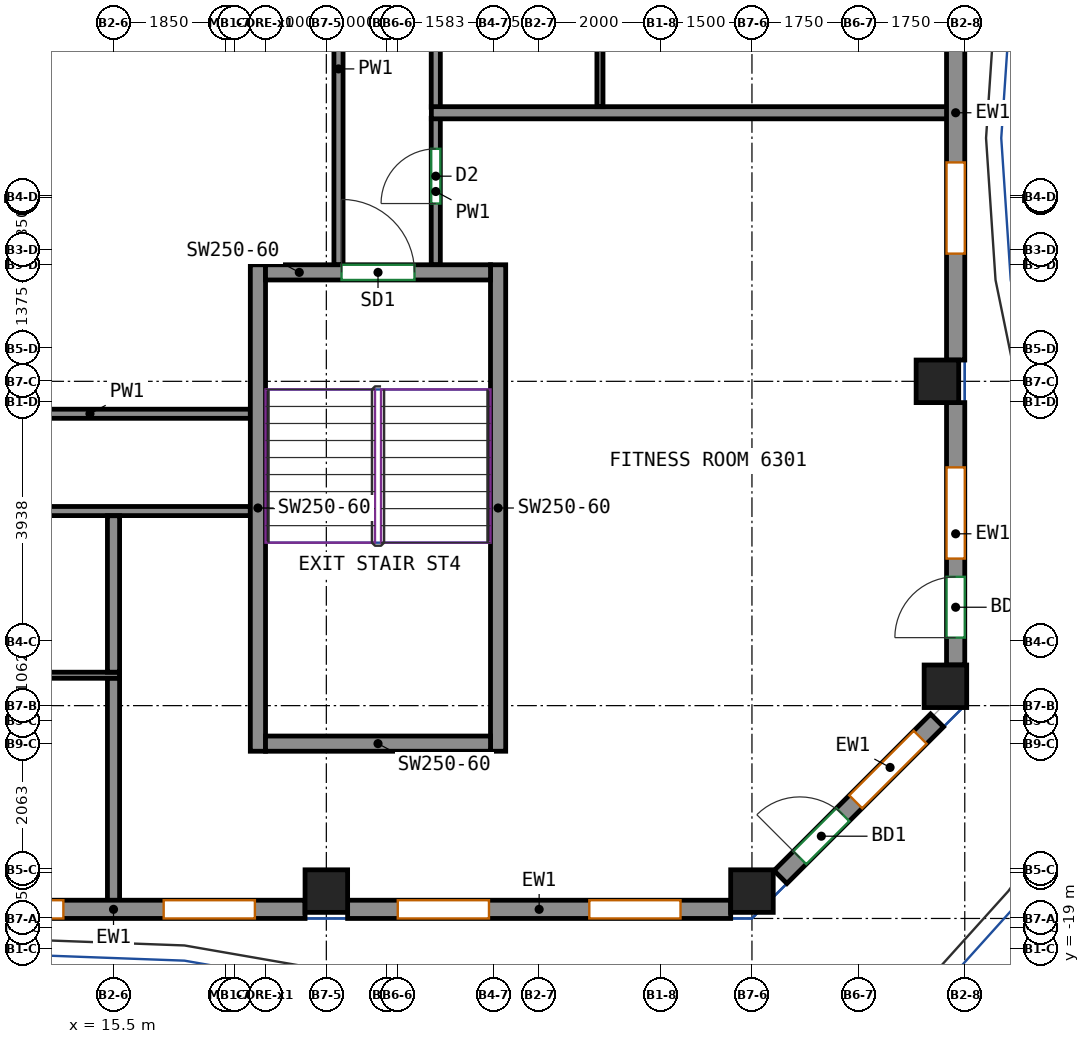
"""IFC4 building model, lengths in metres.
Left out: names, types, materials, properties, quantities, classifications, styles, units other than length and angle.
Written with IfcOpenShell. Run it as: python <this file> out.ifc"""

import sys

from ifc_helpers import new_model, si_unit, direction, frame, frame_2d, origin, origin_2d, place, context, subcontext, project, spatial, rectangle, extrude, source, transform, mapped, element, fill, save


model = new_model("IFC4")
c1 = context("Model", 3, precision=1e-05, world=origin(), true_north=direction((0.0, 1.0)))
c2 = subcontext(c1, "Body", "Model", "MODEL_VIEW")
j1 = project(units=[si_unit("LENGTHUNIT", "METRE"), si_unit("PLANEANGLEUNIT", "RADIAN")], contexts=[c1])
p1 = place(None, origin())
s1 = spatial("IfcSite", under=j1, at=p1, CompositionType="ELEMENT")
p2 = place(p1, origin())
s2 = spatial("IfcBuilding", under=s1, at=p2, CompositionType="ELEMENT")
p3 = place(p2, frame((0.0, 0.0, 259.4)))
s3 = spatial("IfcBuildingStorey", under=s2, at=p3, CompositionType="ELEMENT", Elevation=259.4)
m1 = source(origin(), c2, "Body", "SweptSolid", [
    extrude(rectangle(XDim=0.7, YDim=0.7, at=origin_2d()), origin(), (0.0, 0.0, 1.0), 3.0),
])
for number, where, z_axis, x_axis in (
    (1, (19.0, -18.05, 0.0), (0.0, 0.0, 1.0), (1.0, 0.0, 0.0)),
    (2, (26.0, -18.05, 0.0), (0.0, 0.0, 1.0), (1.0, 0.0, 0.0)),
    (3, (29.05, -9.667, 0.0), (0.0, 0.0, 1.0), (1.0, 0.0, 0.0)),
    (4, (29.182, -14.682, 0.0), (0.0, 0.0, 1.0), (1.0, 0.0, 0.0)),
):
    element("IfcColumn", number, at=place(p3, frame(where, z_axis=z_axis, x_axis=x_axis)), inside=s3, PredefinedType="COLUMN", context=c2, shape_type="MappedRepresentation", body=[
        mapped(m1, transform((0.0, 0.0, 0.0))),
    ])
m2 = source(origin(), c2, "Body", "SweptSolid", [
    extrude(rectangle(XDim=8.0, YDim=0.25, at=frame_2d((4.0, 0.0))), origin(), (0.0, 0.0, 1.0), 3.0),
])
for number, where, z_axis, x_axis in (
    (5, (17.875, -15.75, 0.0), (0.0, 0.0, 1.0), (0.0, 1.0, 0.0)),
    (6, (21.825, -15.75, 0.0), (0.0, 0.0, 1.0), (0.0, 1.0, 0.0)),
):
    element("IfcWall", number, at=place(p3, frame(where, z_axis=z_axis, x_axis=x_axis)), inside=s3, PredefinedType="SHEAR", context=c2, shape_type="MappedRepresentation", body=[
        mapped(m2, transform((0.0, 0.0, 0.0))),
    ])
m3 = source(origin(), c2, "Body", "SweptSolid", [
    extrude(rectangle(XDim=3.7, YDim=0.25, at=frame_2d((1.85, 0.0))), origin(), (0.0, 0.0, 1.0), 3.0),
])
p4 = place(p3, frame((18.0, -15.625, 0.0), z_axis=(0.0, 0.0, 1.0), x_axis=(1.0, 0.0, 0.0)))
e7 = element("IfcWall", 7, at=p4, inside=s3, PredefinedType="SHEAR", context=c2, shape_type="MappedRepresentation", body=[
    mapped(m3, transform((0.0, 0.0, 0.0))),
])
p5 = place(p3, frame((18.0, -7.875, 0.0), z_axis=(0.0, 0.0, 1.0), x_axis=(1.0, 0.0, 0.0)))
e8 = element("IfcWall", 8, at=p5, inside=s3, PredefinedType="SHEAR", context=c2, shape_type="MappedRepresentation", body=[
    mapped(m3, transform((0.0, 0.0, 0.0))),
])
p6 = place(p5, frame((1.25, 0.0, 0.0)))
e9 = element("IfcOpeningElement", 9, at=p6, cuts=e8, PredefinedType="OPENING", context=c2, shape_type="SweptSolid", body=[
    extrude(rectangle(XDim=1.2, YDim=2.1, at=frame_2d((0.6, 1.05))), frame((0.0, 0.135, 0.0), z_axis=(0.0, -1.0, 0.0), x_axis=(1.0, 0.0, 0.0)), (0.0, 0.0, 1.0), 0.27),
])
m4 = source(origin(), c2, "Body", "SweptSolid", [
    extrude(rectangle(XDim=6.3, YDim=0.3, at=frame_2d((3.15, 0.0))), origin(), (0.0, 0.0, 1.0), 3.0),
])
p7 = place(p3, frame((12.35, -18.35, 0.0), z_axis=(0.0, 0.0, 1.0), x_axis=(1.0, 0.0, 0.0)))
e10 = element("IfcWall", 10, at=p7, inside=s3, PredefinedType="SOLIDWALL", context=c2, shape_type="MappedRepresentation", body=[
    mapped(m4, transform((0.0, 0.0, 0.0))),
])
p8 = place(p7, frame((0.825, 0.0, 0.8)))
e11 = element("IfcOpeningElement", 11, at=p8, cuts=e10, PredefinedType="OPENING", context=c2, shape_type="SweptSolid", body=[
    extrude(rectangle(XDim=1.5, YDim=2.05, at=frame_2d((0.75, 1.025))), frame((0.0, 0.16, 0.0), z_axis=(0.0, -1.0, 0.0), x_axis=(1.0, 0.0, 0.0)), (0.0, 0.0, 1.0), 0.32),
])
p9 = place(p7, frame((3.975, 0.0, 0.8)))
e12 = element("IfcOpeningElement", 12, at=p9, cuts=e10, PredefinedType="OPENING", context=c2, shape_type="SweptSolid", body=[
    extrude(rectangle(XDim=1.5, YDim=2.05, at=frame_2d((0.75, 1.025))), frame((0.0, 0.16, 0.0), z_axis=(0.0, -1.0, 0.0), x_axis=(1.0, 0.0, 0.0)), (0.0, 0.0, 1.0), 0.32),
])
p10 = place(p3, frame((19.35, -18.35, 0.0), z_axis=(0.0, 0.0, 1.0), x_axis=(1.0, 0.0, 0.0)))
e13 = element("IfcWall", 13, at=p10, inside=s3, PredefinedType="SOLIDWALL", context=c2, shape_type="MappedRepresentation", body=[
    mapped(m4, transform((0.0, 0.0, 0.0))),
])
p11 = place(p10, frame((0.825, 0.0, 0.8)))
e14 = element("IfcOpeningElement", 14, at=p11, cuts=e13, PredefinedType="OPENING", context=c2, shape_type="SweptSolid", body=[
    extrude(rectangle(XDim=1.5, YDim=2.05, at=frame_2d((0.75, 1.025))), frame((0.0, 0.16, 0.0), z_axis=(0.0, -1.0, 0.0), x_axis=(1.0, 0.0, 0.0)), (0.0, 0.0, 1.0), 0.32),
])
p12 = place(p10, frame((3.975, 0.0, 0.8)))
e15 = element("IfcOpeningElement", 15, at=p12, cuts=e13, PredefinedType="OPENING", context=c2, shape_type="SweptSolid", body=[
    extrude(rectangle(XDim=1.5, YDim=2.05, at=frame_2d((0.75, 1.025))), frame((0.0, 0.16, 0.0), z_axis=(0.0, -1.0, 0.0), x_axis=(1.0, 0.0, 0.0)), (0.0, 0.0, 1.0), 0.32),
])
m5 = source(origin(), c2, "Body", "SweptSolid", [
    extrude(rectangle(XDim=3.642, YDim=0.3, at=frame_2d((1.821, 0.0))), origin(), (0.0, 0.0, 1.0), 3.0),
])
p13 = place(p3, frame((26.469, -17.819, 0.0), z_axis=(0.0, 0.0, 1.0), x_axis=(0.707106781187, 0.707106781187, 0.0)))
e16 = element("IfcWall", 16, at=p13, inside=s3, PredefinedType="SOLIDWALL", context=c2, shape_type="MappedRepresentation", body=[
    mapped(m5, transform((0.0, 0.0, 0.0))),
])
p14 = place(p13, frame((1.75, 0.0, 0.8)))
e17 = element("IfcOpeningElement", 17, at=p14, cuts=e16, PredefinedType="OPENING", context=c2, shape_type="SweptSolid", body=[
    extrude(rectangle(XDim=1.5, YDim=2.05, at=frame_2d((0.75, 1.025))), frame((0.0, 0.16, 0.0), z_axis=(0.0, -1.0, 0.0), x_axis=(1.0, 0.0, 0.0)), (0.0, 0.0, 1.0), 0.32),
])
p15 = place(p13, frame((0.45, 0.0, 0.0)))
e18 = element("IfcOpeningElement", 18, at=p15, cuts=e16, PredefinedType="OPENING", context=c2, shape_type="SweptSolid", body=[
    extrude(rectangle(XDim=1.0, YDim=2.1, at=frame_2d((0.5, 1.05))), frame((0.0, 0.16, 0.0), z_axis=(0.0, -1.0, 0.0), x_axis=(1.0, 0.0, 0.0)), (0.0, 0.0, 1.0), 0.32),
])
m6 = source(origin(), c2, "Body", "SweptSolid", [
    extrude(rectangle(XDim=4.315, YDim=0.3, at=frame_2d((2.158, 0.0))), origin(), (0.0, 0.0, 1.0), 3.0),
])
p16 = place(p3, frame((29.35, -14.332, 0.0), z_axis=(0.0, 0.0, 1.0), x_axis=(0.0, 1.0, 0.0)))
e19 = element("IfcWall", 19, at=p16, inside=s3, PredefinedType="SOLIDWALL", context=c2, shape_type="MappedRepresentation", body=[
    mapped(m6, transform((0.0, 0.0, 0.0))),
])
p17 = place(p16, frame((1.75, 0.0, 0.8)))
e20 = element("IfcOpeningElement", 20, at=p17, cuts=e19, PredefinedType="OPENING", context=c2, shape_type="SweptSolid", body=[
    extrude(rectangle(XDim=1.5, YDim=2.05, at=frame_2d((0.75, 1.025))), frame((0.0, 0.16, 0.0), z_axis=(0.0, -1.0, 0.0), x_axis=(1.0, 0.0, 0.0)), (0.0, 0.0, 1.0), 0.32),
])
p18 = place(p16, frame((0.45, 0.0, 0.0)))
e21 = element("IfcOpeningElement", 21, at=p18, cuts=e19, PredefinedType="OPENING", context=c2, shape_type="SweptSolid", body=[
    extrude(rectangle(XDim=1.0, YDim=2.1, at=frame_2d((0.5, 1.05))), frame((0.0, 0.16, 0.0), z_axis=(0.0, -1.0, 0.0), x_axis=(1.0, 0.0, 0.0)), (0.0, 0.0, 1.0), 0.32),
])
m7 = source(origin(), c2, "Body", "SweptSolid", [
    extrude(rectangle(XDim=8.133, YDim=0.3, at=frame_2d((4.067, 0.0))), origin(), (0.0, 0.0, 1.0), 3.0),
])
p19 = place(p3, frame((29.35, -9.317, 0.0), z_axis=(0.0, 0.0, 1.0), x_axis=(0.0, 1.0, 0.0)))
e22 = element("IfcWall", 22, at=p19, inside=s3, PredefinedType="SOLIDWALL", context=c2, shape_type="MappedRepresentation", body=[
    mapped(m7, transform((0.0, 0.0, 0.0))),
])
p20 = place(p19, frame((1.75, 0.0, 0.8)))
e23 = element("IfcOpeningElement", 23, at=p20, cuts=e22, PredefinedType="OPENING", context=c2, shape_type="SweptSolid", body=[
    extrude(rectangle(XDim=1.5, YDim=2.05, at=frame_2d((0.75, 1.025))), frame((0.0, 0.16, 0.0), z_axis=(0.0, -1.0, 0.0), x_axis=(1.0, 0.0, 0.0)), (0.0, 0.0, 1.0), 0.32),
])
p21 = place(p19, frame((5.817, 0.0, 0.8)))
e24 = element("IfcOpeningElement", 24, at=p21, cuts=e22, PredefinedType="OPENING", context=c2, shape_type="SweptSolid", body=[
    extrude(rectangle(XDim=1.5, YDim=2.05, at=frame_2d((0.75, 1.025))), frame((0.0, 0.16, 0.0), z_axis=(0.0, -1.0, 0.0), x_axis=(1.0, 0.0, 0.0)), (0.0, 0.0, 1.0), 0.32),
])
p22 = place(p3, frame((-11.8, -11.8, 0.0), z_axis=(0.0, 0.0, 1.0), x_axis=(1.0, 0.0, 0.0)))
e25 = element("IfcWall", 25, at=p22, inside=s3, PredefinedType="PARTITIONING", context=c2, shape_type="SweptSolid", body=[
    extrude(rectangle(XDim=29.55, YDim=0.15, at=frame_2d((14.775, 0.0))), origin(), (0.0, 0.0, 1.0), 3.0),
])
p23 = place(p22, frame((8.26, 0.0, 0.0)))
e26 = element("IfcOpeningElement", 26, at=p23, cuts=e25, PredefinedType="OPENING", context=c2, shape_type="SweptSolid", body=[
    extrude(rectangle(XDim=1.0, YDim=2.1, at=frame_2d((0.5, 1.05))), frame((0.0, 0.085, 0.0), z_axis=(0.0, -1.0, 0.0), x_axis=(1.0, 0.0, 0.0)), (0.0, 0.0, 1.0), 0.17),
])
p24 = place(p3, frame((20.8, -7.75, 0.0), z_axis=(0.0, 0.0, 1.0), x_axis=(0.0, 1.0, 0.0)))
e27 = element("IfcWall", 27, at=p24, inside=s3, PredefinedType="PARTITIONING", context=c2, shape_type="SweptSolid", body=[
    extrude(rectangle(XDim=2.41, YDim=0.15, at=frame_2d((1.205, 0.0))), origin(), (0.0, 0.0, 1.0), 3.0),
])
p25 = place(p24, frame((1.007, 0.0, 0.0)))
e28 = element("IfcOpeningElement", 28, at=p25, cuts=e27, PredefinedType="OPENING", context=c2, shape_type="SweptSolid", body=[
    extrude(rectangle(XDim=0.9, YDim=2.1, at=frame_2d((0.45, 1.05))), frame((0.0, 0.085, 0.0), z_axis=(0.0, -1.0, 0.0), x_axis=(1.0, 0.0, 0.0)), (0.0, 0.0, 1.0), 0.17),
])
p26 = place(p3, frame((20.8, -5.16, 0.0), z_axis=(0.0, 0.0, 1.0), x_axis=(0.0, 1.0, 0.0)))
e29 = element("IfcWall", 29, at=p26, inside=s3, PredefinedType="PARTITIONING", context=c2, shape_type="SweptSolid", body=[
    extrude(rectangle(XDim=5.32, YDim=0.15, at=frame_2d((2.66, 0.0))), origin(), (0.0, 0.0, 1.0), 3.0),
])
p27 = place(p3, frame((19.2, -7.75, 0.0), z_axis=(0.0, 0.0, 1.0), x_axis=(0.0, 1.0, 0.0)))
e30 = element("IfcWall", 30, at=p27, inside=s3, PredefinedType="PARTITIONING", context=c2, shape_type="SweptSolid", body=[
    extrude(rectangle(XDim=6.442, YDim=0.15, at=frame_2d((3.221, 0.0))), origin(), (0.0, 0.0, 1.0), 3.0),
])
p28 = place(p3, frame((12.475, -10.2, 0.0), z_axis=(0.0, 0.0, 1.0), x_axis=(1.0, 0.0, 0.0)))
e31 = element("IfcWall", 31, at=p28, inside=s3, PredefinedType="PARTITIONING", context=c2, shape_type="SweptSolid", body=[
    extrude(rectangle(XDim=5.275, YDim=0.15, at=frame_2d((2.637, 0.0))), origin(), (0.0, 0.0, 1.0), 3.0),
])
p29 = place(p3, frame((-9.1, -14.5, 0.0), z_axis=(0.0, 0.0, 1.0), x_axis=(1.0, 0.0, 0.0)))
e32 = element("IfcWall", 32, at=p29, inside=s3, PredefinedType="PARTITIONING", context=c2, shape_type="SweptSolid", body=[
    extrude(rectangle(XDim=24.7, YDim=0.1, at=frame_2d((12.35, 0.0))), origin(), (0.0, 0.0, 1.0), 3.0),
])
p30 = place(p29, frame((1.763, 0.0, 0.0)))
e33 = element("IfcOpeningElement", 33, at=p30, cuts=e32, PredefinedType="OPENING", context=c2, shape_type="SweptSolid", body=[
    extrude(rectangle(XDim=1.0, YDim=2.1, at=frame_2d((0.5, 1.05))), frame((0.0, 0.06, 0.0), z_axis=(0.0, -1.0, 0.0), x_axis=(1.0, 0.0, 0.0)), (0.0, 0.0, 1.0), 0.12),
])
p31 = place(p29, frame((12.055, 0.0, 0.0)))
e34 = element("IfcOpeningElement", 34, at=p31, cuts=e32, PredefinedType="OPENING", context=c2, shape_type="SweptSolid", body=[
    extrude(rectangle(XDim=1.0, YDim=2.1, at=frame_2d((0.5, 1.05))), frame((0.0, 0.06, 0.0), z_axis=(0.0, -1.0, 0.0), x_axis=(1.0, 0.0, 0.0)), (0.0, 0.0, 1.0), 0.12),
])
p32 = place(p3, frame((15.5, -14.45, 0.0), z_axis=(0.0, 0.0, 1.0), x_axis=(0.0, 1.0, 0.0)))
e35 = element("IfcWall", 35, at=p32, inside=s3, PredefinedType="PARTITIONING", context=c2, shape_type="SweptSolid", body=[
    extrude(rectangle(XDim=2.573, YDim=0.2, at=frame_2d((1.287, 0.0))), origin(), (0.0, 0.0, 1.0), 3.0),
])
p33 = place(p3, frame((15.5, -18.25, 0.0), z_axis=(0.0, 0.0, 1.0), x_axis=(0.0, 1.0, 0.0)))
e36 = element("IfcWall", 36, at=p33, inside=s3, PredefinedType="PARTITIONING", context=c2, shape_type="SweptSolid", body=[
    extrude(rectangle(XDim=3.698, YDim=0.2, at=frame_2d((1.849, 0.0))), origin(), (0.0, 0.0, 1.0), 3.0),
])
p34 = place(p3, frame((20.727, -5.25, 0.0), z_axis=(0.0, 0.0, 1.0), x_axis=(1.0, 0.0, 0.0)))
e37 = element("IfcWall", 37, at=p34, inside=s3, PredefinedType="PARTITIONING", context=c2, shape_type="SweptSolid", body=[
    extrude(rectangle(XDim=8.523, YDim=0.2, at=frame_2d((4.261, 0.0))), origin(), (0.0, 0.0, 1.0), 3.0),
])
p35 = place(p3, frame((23.5, -5.15, 0.0), z_axis=(0.0, 0.0, 1.0), x_axis=(0.0, 1.0, 0.0)))
e38 = element("IfcWall", 38, at=p35, inside=s3, PredefinedType="PARTITIONING", context=c2, shape_type="SweptSolid", body=[
    extrude(rectangle(XDim=4.277, YDim=0.1, at=frame_2d((2.138, 0.0))), origin(), (0.0, 0.0, 1.0), 3.0),
])
p36 = place(p35, frame((1.432, 0.0, 0.0)))
e39 = element("IfcOpeningElement", 39, at=p36, cuts=e38, PredefinedType="OPENING", context=c2, shape_type="SweptSolid", body=[
    extrude(rectangle(XDim=0.9, YDim=2.1, at=frame_2d((0.45, 1.05))), frame((0.0, 0.06, 0.0), z_axis=(0.0, -1.0, 0.0), x_axis=(1.0, 0.0, 0.0)), (0.0, 0.0, 1.0), 0.12),
])
p37 = place(p8, origin())
e40 = element("IfcWindow", 40, at=p37, inside=s3, PartitioningType="SINGLE_PANEL", PredefinedType="WINDOW", context=c2, shape_type="SweptSolid", body=[
    extrude(rectangle(XDim=1.5, YDim=2.05, at=frame_2d((0.75, 1.025))), frame((0.0, 0.03, 0.0), z_axis=(0.0, -1.0, 0.0), x_axis=(1.0, 0.0, 0.0)), (0.0, 0.0, 1.0), 0.06),
])
fill(e11, e40)
p38 = place(p9, origin())
e41 = element("IfcWindow", 41, at=p38, inside=s3, PartitioningType="SINGLE_PANEL", PredefinedType="WINDOW", context=c2, shape_type="SweptSolid", body=[
    extrude(rectangle(XDim=1.5, YDim=2.05, at=frame_2d((0.75, 1.025))), frame((0.0, 0.03, 0.0), z_axis=(0.0, -1.0, 0.0), x_axis=(1.0, 0.0, 0.0)), (0.0, 0.0, 1.0), 0.06),
])
fill(e12, e41)
p39 = place(p11, origin())
e42 = element("IfcWindow", 42, at=p39, inside=s3, PartitioningType="SINGLE_PANEL", PredefinedType="WINDOW", context=c2, shape_type="SweptSolid", body=[
    extrude(rectangle(XDim=1.5, YDim=2.05, at=frame_2d((0.75, 1.025))), frame((0.0, 0.03, 0.0), z_axis=(0.0, -1.0, 0.0), x_axis=(1.0, 0.0, 0.0)), (0.0, 0.0, 1.0), 0.06),
])
fill(e14, e42)
p40 = place(p12, origin())
e43 = element("IfcWindow", 43, at=p40, inside=s3, PartitioningType="SINGLE_PANEL", PredefinedType="WINDOW", context=c2, shape_type="SweptSolid", body=[
    extrude(rectangle(XDim=1.5, YDim=2.05, at=frame_2d((0.75, 1.025))), frame((0.0, 0.03, 0.0), z_axis=(0.0, -1.0, 0.0), x_axis=(1.0, 0.0, 0.0)), (0.0, 0.0, 1.0), 0.06),
])
fill(e15, e43)
p41 = place(p14, origin())
e44 = element("IfcWindow", 44, at=p41, inside=s3, PartitioningType="SINGLE_PANEL", PredefinedType="WINDOW", context=c2, shape_type="SweptSolid", body=[
    extrude(rectangle(XDim=1.5, YDim=2.05, at=frame_2d((0.75, 1.025))), frame((0.0, 0.03, 0.0), z_axis=(0.0, -1.0, 0.0), x_axis=(1.0, 0.0, 0.0)), (0.0, 0.0, 1.0), 0.06),
])
fill(e17, e44)
p42 = place(p15, origin())
e45 = element("IfcDoor", 45, at=p42, inside=s3, OperationType="SINGLE_SWING_LEFT", PredefinedType="DOOR", context=c2, shape_type="SweptSolid", body=[
    extrude(rectangle(XDim=1.0, YDim=2.1, at=frame_2d((0.5, 1.05))), frame((0.0, 0.025, 0.0), z_axis=(0.0, -1.0, 0.0), x_axis=(1.0, 0.0, 0.0)), (0.0, 0.0, 1.0), 0.05),
])
fill(e18, e45)
p43 = place(p17, origin())
e46 = element("IfcWindow", 46, at=p43, inside=s3, PartitioningType="SINGLE_PANEL", PredefinedType="WINDOW", context=c2, shape_type="SweptSolid", body=[
    extrude(rectangle(XDim=1.5, YDim=2.05, at=frame_2d((0.75, 1.025))), frame((0.0, 0.03, 0.0), z_axis=(0.0, -1.0, 0.0), x_axis=(1.0, 0.0, 0.0)), (0.0, 0.0, 1.0), 0.06),
])
fill(e20, e46)
p44 = place(p18, origin())
e47 = element("IfcDoor", 47, at=p44, inside=s3, OperationType="SINGLE_SWING_LEFT", PredefinedType="DOOR", context=c2, shape_type="SweptSolid", body=[
    extrude(rectangle(XDim=1.0, YDim=2.1, at=frame_2d((0.5, 1.05))), frame((0.0, 0.025, 0.0), z_axis=(0.0, -1.0, 0.0), x_axis=(1.0, 0.0, 0.0)), (0.0, 0.0, 1.0), 0.05),
])
fill(e21, e47)
p45 = place(p20, origin())
e48 = element("IfcWindow", 48, at=p45, inside=s3, PartitioningType="SINGLE_PANEL", PredefinedType="WINDOW", context=c2, shape_type="SweptSolid", body=[
    extrude(rectangle(XDim=1.5, YDim=2.05, at=frame_2d((0.75, 1.025))), frame((0.0, 0.03, 0.0), z_axis=(0.0, -1.0, 0.0), x_axis=(1.0, 0.0, 0.0)), (0.0, 0.0, 1.0), 0.06),
])
fill(e23, e48)
p46 = place(p6, origin())
e49 = element("IfcDoor", 49, at=p46, inside=s3, OperationType="DOUBLE_DOOR_SINGLE_SWING", PredefinedType="DOOR", context=c2, shape_type="SweptSolid", body=[
    extrude(rectangle(XDim=1.2, YDim=2.1, at=frame_2d((0.6, 1.05))), frame((0.0, 0.025, 0.0), z_axis=(0.0, -1.0, 0.0), x_axis=(1.0, 0.0, 0.0)), (0.0, 0.0, 1.0), 0.05),
])
fill(e9, e49)
p47 = place(p25, origin())
e50 = element("IfcDoor", 50, at=p47, inside=s3, OperationType="SINGLE_SWING_LEFT", PredefinedType="DOOR", context=c2, shape_type="SweptSolid", body=[
    extrude(rectangle(XDim=0.9, YDim=2.1, at=frame_2d((0.45, 1.05))), frame((0.0, 0.025, 0.0), z_axis=(0.0, -1.0, 0.0), x_axis=(1.0, 0.0, 0.0)), (0.0, 0.0, 1.0), 0.05),
])
fill(e28, e50)
save(model, sys.argv[1])
